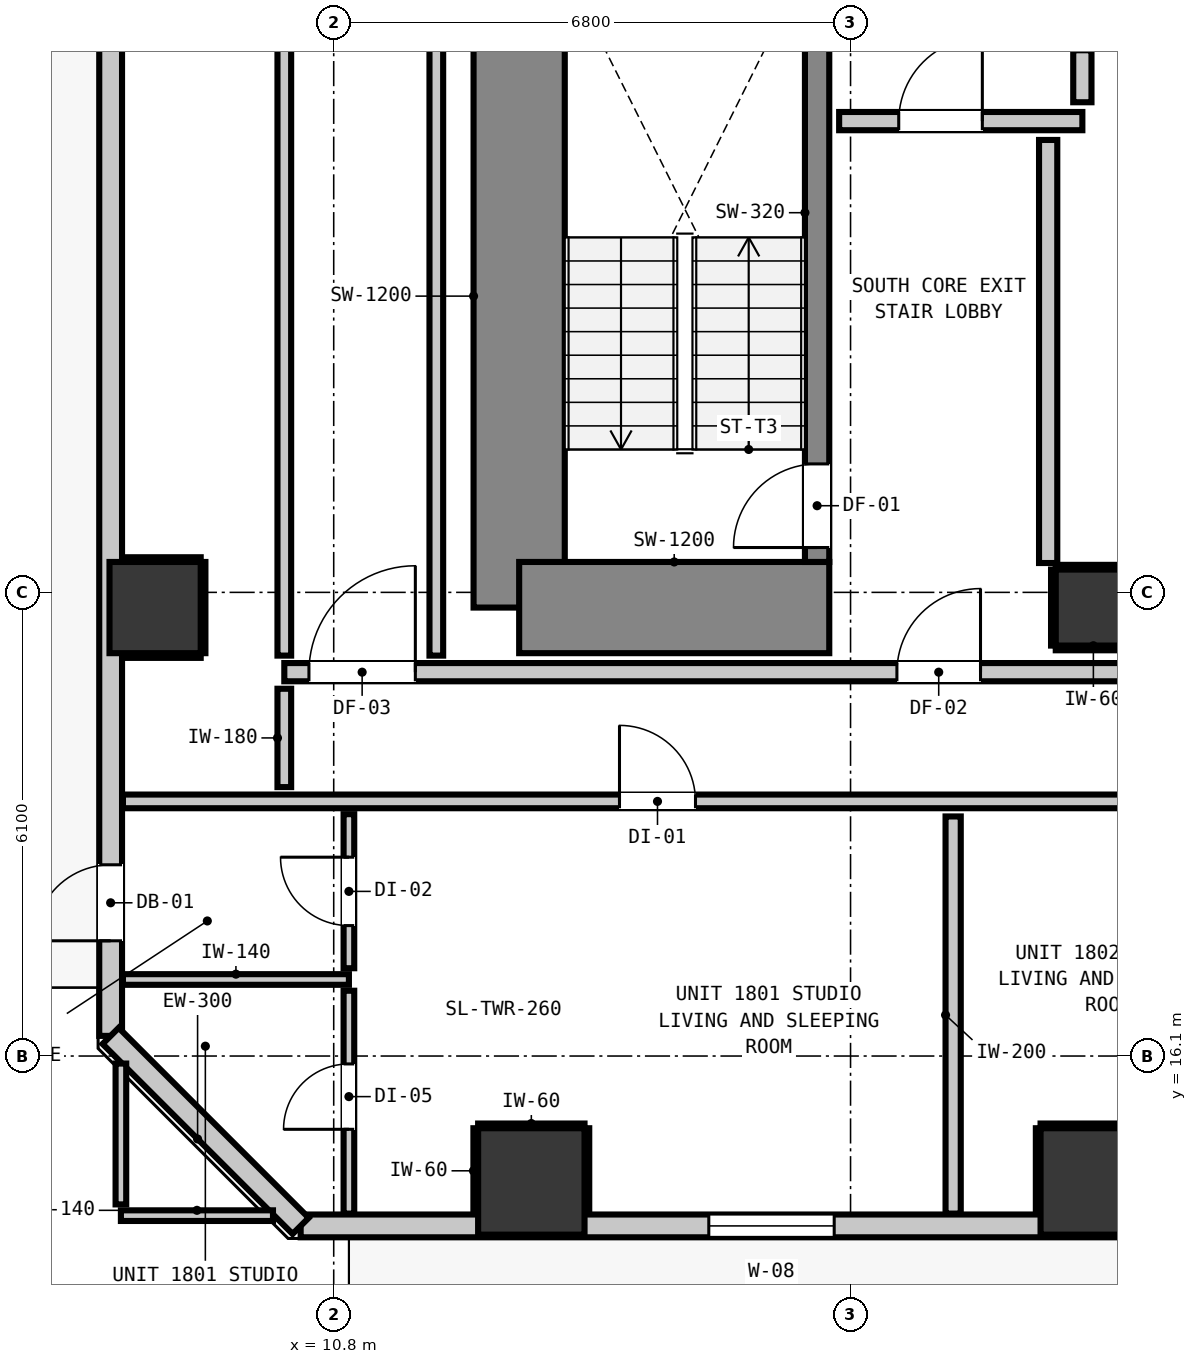
"""IFC4 building model, lengths in metres.
Left out: names, types, materials, properties, quantities, classifications, styles, units other than length and angle.
Written with IfcOpenShell. Run it as: python <this file> out.ifc"""

import sys

from ifc_helpers import new_model, si_unit, direction, frame, frame_2d, origin, origin_2d, place, context, subcontext, project, spatial, rectangle, extrude, element, fill, save


model = new_model("IFC4")
c1 = context("Model", 3, precision=1e-05, world=origin(), true_north=direction((0.0, 1.0)))
c2 = subcontext(c1, "Body", "Model", "MODEL_VIEW")
j1 = project(units=[si_unit("LENGTHUNIT", "METRE"), si_unit("PLANEANGLEUNIT", "RADIAN")], contexts=[c1])
p1 = place(None, origin())
s1 = spatial("IfcSite", under=j1, at=p1, CompositionType="ELEMENT")
p2 = place(p1, origin())
s2 = spatial("IfcBuilding", under=s1, at=p2, CompositionType="ELEMENT")
p3 = place(p2, frame((0.0, 0.0, 65.16)))
s3 = spatial("IfcBuildingStorey", under=s2, at=p3, CompositionType="ELEMENT", Elevation=65.16)
p4 = place(p3, frame((20.8, 22.0, 0.0), z_axis=(0.0, 0.0, 1.0), x_axis=(1.0, 0.0, 0.0)))
e1 = element("IfcColumn", 1, at=p4, inside=s3, PredefinedType="COLUMN", context=c2, shape_type="SweptSolid", body=[
    extrude(rectangle(XDim=1.0, YDim=1.0, at=origin_2d()), origin(), (0.0, 0.0, 1.0), 3.32),
])
p5 = place(p3, frame((13.24, 22.0, 0.0), z_axis=(0.0, 0.0, 1.0), x_axis=(0.0, 1.0, 0.0)))
e2 = element("IfcWall", 2, at=p5, inside=s3, PredefinedType="SHEAR", context=c2, shape_type="SweptSolid", body=[
    extrude(rectangle(XDim=8.195, YDim=1.2, at=frame_2d((4.098, 0.0))), origin(), (0.0, 0.0, 1.0), 3.32),
])
p6 = place(p3, frame((13.24, 22.0, 0.0), z_axis=(0.0, 0.0, 1.0), x_axis=(1.0, 0.0, 0.0)))
e3 = element("IfcWall", 3, at=p6, inside=s3, PredefinedType="SHEAR", context=c2, shape_type="SweptSolid", body=[
    extrude(rectangle(XDim=4.08, YDim=1.2, at=frame_2d((2.04, 0.0))), origin(), (0.0, 0.0, 1.0), 3.32),
])
p7 = place(p3, frame((17.16, 22.6, 0.0), z_axis=(0.0, 0.0, 1.0), x_axis=(0.0, 1.0, 0.0)))
e4 = element("IfcWall", 4, at=p7, inside=s3, PredefinedType="SHEAR", context=c2, shape_type="SweptSolid", body=[
    extrude(rectangle(XDim=7.8, YDim=0.32, at=frame_2d((3.9, 0.0))), origin(), (0.0, 0.0, 1.0), 3.32),
])
p8 = place(p7, frame((0.19, 0.0, 0.0)))
e5 = element("IfcOpeningElement", 5, at=p8, cuts=e4, PredefinedType="OPENING", context=c2, shape_type="SweptSolid", body=[
    extrude(rectangle(XDim=1.1, YDim=2.15, at=frame_2d((0.55, 1.075))), frame((0.0, 0.17, 0.0), z_axis=(0.0, -1.0, 0.0), x_axis=(1.0, 0.0, 0.0)), (0.0, 0.0, 1.0), 0.34),
])
for number, where, z_axis, x_axis in (
    (6, (13.4, 14.45, 0.0), (0.0, 0.0, 1.0), (1.0, 0.0, 0.0)),
    (7, (20.8, 14.45, 0.0), (0.0, 0.0, 1.0), (1.0, 0.0, 0.0)),
):
    element("IfcColumn", number, at=place(p3, frame(where, z_axis=z_axis, x_axis=x_axis)), inside=s3, PredefinedType="COLUMN", context=c2, shape_type="SweptSolid", body=[
        extrude(rectangle(XDim=1.4, YDim=1.4, at=origin_2d()), origin(), (0.0, 0.0, 1.0), 3.32),
    ])
p9 = place(p3, frame((8.45, 22.0, 0.0), z_axis=(0.0, 0.0, 1.0), x_axis=(1.0, 0.0, 0.0)))
e8 = element("IfcColumn", 8, at=p9, inside=s3, PredefinedType="COLUMN", context=c2, shape_type="SweptSolid", body=[
    extrude(rectangle(XDim=1.2, YDim=1.2, at=origin_2d()), origin(), (0.0, 0.0, 1.0), 3.32),
])
p10 = place(p3, frame((7.865, 16.365, 0.0), z_axis=(0.0, 0.0, 1.0), x_axis=(0.0, 1.0, 0.0)))
e9 = element("IfcWall", 9, at=p10, inside=s3, PredefinedType="STANDARD", context=c2, shape_type="SweptSolid", body=[
    extrude(rectangle(XDim=34.67, YDim=0.3, at=frame_2d((17.335, 0.0))), origin(), (0.0, 0.0, 1.0), 3.06),
])
p11 = place(p10, frame((1.251, 0.0, 0.0)))
e10 = element("IfcOpeningElement", 10, at=p11, cuts=e9, PredefinedType="OPENING", context=c2, shape_type="SweptSolid", body=[
    extrude(rectangle(XDim=1.0, YDim=2.15, at=frame_2d((0.5, 1.075))), frame((0.0, 0.16, 0.0), z_axis=(0.0, -1.0, 0.0), x_axis=(1.0, 0.0, 0.0)), (0.0, 0.0, 1.0), 0.32),
])
p12 = place(p10, frame((32.432, 0.0, 0.85)))
e11 = element("IfcOpeningElement", 11, at=p12, cuts=e9, PredefinedType="OPENING", context=c2, shape_type="SweptSolid", body=[
    extrude(rectangle(XDim=1.65, YDim=1.75, at=frame_2d((0.825, 0.875))), frame((0.0, 0.16, 0.0), z_axis=(0.0, -1.0, 0.0), x_axis=(1.0, 0.0, 0.0)), (0.0, 0.0, 1.0), 0.32),
])
p13 = place(p3, frame((47.835, 13.865, 0.0), z_axis=(0.0, 0.0, 1.0), x_axis=(-1.0, 0.0, 0.0)))
e12 = element("IfcWall", 12, at=p13, inside=s3, PredefinedType="STANDARD", context=c2, shape_type="SweptSolid", body=[
    extrude(rectangle(XDim=37.47, YDim=0.3, at=frame_2d((18.735, 0.0))), origin(), (0.0, 0.0, 1.0), 3.06),
])
p14 = place(p13, frame((1.251, 0.0, 0.0)))
e13 = element("IfcOpeningElement", 13, at=p14, cuts=e12, PredefinedType="OPENING", context=c2, shape_type="SweptSolid", body=[
    extrude(rectangle(XDim=1.0, YDim=2.15, at=frame_2d((0.5, 1.075))), frame((0.0, 0.16, 0.0), z_axis=(0.0, -1.0, 0.0), x_axis=(1.0, 0.0, 0.0)), (0.0, 0.0, 1.0), 0.32),
])
p15 = place(p13, frame((30.45, 0.0, 0.85)))
e14 = element("IfcOpeningElement", 14, at=p15, cuts=e12, PredefinedType="OPENING", context=c2, shape_type="SweptSolid", body=[
    extrude(rectangle(XDim=1.65, YDim=1.75, at=frame_2d((0.825, 0.875))), frame((0.0, 0.16, 0.0), z_axis=(0.0, -1.0, 0.0), x_axis=(1.0, 0.0, 0.0)), (0.0, 0.0, 1.0), 0.32),
])
p16 = place(p13, frame((24.05, 0.0, 0.85)))
e15 = element("IfcOpeningElement", 15, at=p16, cuts=e12, PredefinedType="OPENING", context=c2, shape_type="SweptSolid", body=[
    extrude(rectangle(XDim=1.65, YDim=1.75, at=frame_2d((0.825, 0.875))), frame((0.0, 0.16, 0.0), z_axis=(0.0, -1.0, 0.0), x_axis=(1.0, 0.0, 0.0)), (0.0, 0.0, 1.0), 0.32),
])
p17 = place(p13, frame((13.457, 0.0, 0.85)))
e16 = element("IfcOpeningElement", 16, at=p17, cuts=e12, PredefinedType="OPENING", context=c2, shape_type="SweptSolid", body=[
    extrude(rectangle(XDim=1.65, YDim=1.75, at=frame_2d((0.825, 0.875))), frame((0.0, 0.16, 0.0), z_axis=(0.0, -1.0, 0.0), x_axis=(1.0, 0.0, 0.0)), (0.0, 0.0, 1.0), 0.32),
])
p18 = place(p13, frame((16.017, 0.0, 0.85)))
e17 = element("IfcOpeningElement", 17, at=p18, cuts=e12, PredefinedType="OPENING", context=c2, shape_type="SweptSolid", body=[
    extrude(rectangle(XDim=1.65, YDim=1.75, at=frame_2d((0.825, 0.875))), frame((0.0, 0.16, 0.0), z_axis=(0.0, -1.0, 0.0), x_axis=(1.0, 0.0, 0.0)), (0.0, 0.0, 1.0), 0.32),
])
p19 = place(p13, frame((4.992, 0.0, 0.85)))
e18 = element("IfcOpeningElement", 18, at=p19, cuts=e12, PredefinedType="OPENING", context=c2, shape_type="SweptSolid", body=[
    extrude(rectangle(XDim=1.65, YDim=1.75, at=frame_2d((0.825, 0.875))), frame((0.0, 0.16, 0.0), z_axis=(0.0, -1.0, 0.0), x_axis=(1.0, 0.0, 0.0)), (0.0, 0.0, 1.0), 0.32),
])
p20 = place(p3, frame((10.365, 13.865, 0.0), z_axis=(0.0, 0.0, 1.0), x_axis=(-0.707106781187, 0.707106781187, 0.0)))
e19 = element("IfcWall", 19, at=p20, inside=s3, PredefinedType="STANDARD", context=c2, shape_type="SweptSolid", body=[
    extrude(rectangle(XDim=3.536, YDim=0.3, at=frame_2d((1.768, 0.0))), origin(), (0.0, 0.0, 1.0), 3.06),
])
p21 = place(p3, frame((10.15, 21.15, 0.0), z_axis=(0.0, 0.0, 1.0), x_axis=(1.0, 0.0, 0.0)))
e20 = element("IfcWall", 20, at=p21, inside=s3, PredefinedType="PARTITIONING", context=c2, shape_type="SweptSolid", body=[
    extrude(rectangle(XDim=26.779, YDim=0.24, at=frame_2d((13.39, 0.0))), origin(), (0.0, 0.0, 1.0), 3.06),
])
p22 = place(p21, frame((8.06, 0.0, 0.0)))
e21 = element("IfcOpeningElement", 21, at=p22, cuts=e20, PredefinedType="OPENING", context=c2, shape_type="SweptSolid", body=[
    extrude(rectangle(XDim=1.1, YDim=2.15, at=frame_2d((0.55, 1.075))), frame((0.0, 0.13, 0.0), z_axis=(0.0, -1.0, 0.0), x_axis=(1.0, 0.0, 0.0)), (0.0, 0.0, 1.0), 0.26),
])
p23 = place(p21, frame((0.324, 0.0, 0.0)))
e22 = element("IfcOpeningElement", 22, at=p23, cuts=e20, PredefinedType="OPENING", context=c2, shape_type="SweptSolid", body=[
    extrude(rectangle(XDim=1.4, YDim=2.15, at=frame_2d((0.7, 1.075))), frame((0.0, 0.13, 0.0), z_axis=(0.0, -1.0, 0.0), x_axis=(1.0, 0.0, 0.0)), (0.0, 0.0, 1.0), 0.26),
])
p24 = place(p3, frame((17.45, 28.4, 0.0), z_axis=(0.0, 0.0, 1.0), x_axis=(1.0, 0.0, 0.0)))
e23 = element("IfcWall", 23, at=p24, inside=s3, PredefinedType="PARTITIONING", context=c2, shape_type="SweptSolid", body=[
    extrude(rectangle(XDim=3.2, YDim=0.24, at=frame_2d((1.6, 0.0))), origin(), (0.0, 0.0, 1.0), 3.06),
])
p25 = place(p24, frame((0.784, 0.0, 0.0)))
e24 = element("IfcOpeningElement", 24, at=p25, cuts=e23, PredefinedType="OPENING", context=c2, shape_type="SweptSolid", body=[
    extrude(rectangle(XDim=1.1, YDim=2.15, at=frame_2d((0.55, 1.075))), frame((0.0, 0.13, 0.0), z_axis=(0.0, -1.0, 0.0), x_axis=(1.0, 0.0, 0.0)), (0.0, 0.0, 1.0), 0.26),
])
p26 = place(p3, frame((8.027, 19.45, 0.0), z_axis=(0.0, 0.0, 1.0), x_axis=(1.0, 0.0, 0.0)))
e25 = element("IfcWall", 25, at=p26, inside=s3, PredefinedType="PARTITIONING", context=c2, shape_type="SweptSolid", body=[
    extrude(rectangle(XDim=28.902, YDim=0.18, at=frame_2d((14.451, 0.0))), origin(), (0.0, 0.0, 1.0), 3.06),
])
p27 = place(p26, frame((6.533, 0.0, 0.0)))
e26 = element("IfcOpeningElement", 26, at=p27, cuts=e25, PredefinedType="OPENING", context=c2, shape_type="SweptSolid", body=[
    extrude(rectangle(XDim=1.0, YDim=2.15, at=frame_2d((0.5, 1.075))), frame((0.0, 0.1, 0.0), z_axis=(0.0, -1.0, 0.0), x_axis=(1.0, 0.0, 0.0)), (0.0, 0.0, 1.0), 0.2),
])
p28 = place(p26, frame((13.293, 0.0, 0.0)))
e27 = element("IfcOpeningElement", 27, at=p28, cuts=e25, PredefinedType="OPENING", context=c2, shape_type="SweptSolid", body=[
    extrude(rectangle(XDim=1.0, YDim=2.15, at=frame_2d((0.5, 1.075))), frame((0.0, 0.1, 0.0), z_axis=(0.0, -1.0, 0.0), x_axis=(1.0, 0.0, 0.0)), (0.0, 0.0, 1.0), 0.2),
])
p29 = place(p26, frame((25.026, 0.0, 0.0)))
e28 = element("IfcOpeningElement", 28, at=p29, cuts=e25, PredefinedType="OPENING", context=c2, shape_type="SweptSolid", body=[
    extrude(rectangle(XDim=1.0, YDim=2.15, at=frame_2d((0.5, 1.075))), frame((0.0, 0.1, 0.0), z_axis=(0.0, -1.0, 0.0), x_axis=(1.0, 0.0, 0.0)), (0.0, 0.0, 1.0), 0.2),
])
p30 = place(p3, frame((8.0, 14.0, 0.0), z_axis=(0.0, 0.0, 1.0), x_axis=(1.0, 0.0, 0.0)))
e29 = element("IfcWall", 29, at=p30, inside=s3, PredefinedType="PARTITIONING", context=c2, shape_type="SweptSolid", body=[
    extrude(rectangle(XDim=2.001, YDim=0.14, at=frame_2d((1.0, 0.0))), origin(), (0.0, 0.0, 1.0), 3.06),
])
p31 = place(p3, frame((8.027, 17.107, 0.0), z_axis=(0.0, 0.0, 1.0), x_axis=(1.0, 0.0, 0.0)))
e30 = element("IfcWall", 30, at=p31, inside=s3, PredefinedType="PARTITIONING", context=c2, shape_type="SweptSolid", body=[
    extrude(rectangle(XDim=2.973, YDim=0.14, at=frame_2d((1.486, 0.0))), origin(), (0.0, 0.0, 1.0), 3.06),
])
p32 = place(p3, frame((20.2, 22.586, 0.0), z_axis=(0.0, 0.0, 1.0), x_axis=(0.0, 1.0, 0.0)))
e31 = element("IfcWall", 31, at=p32, inside=s3, PredefinedType="PARTITIONING", context=c2, shape_type="SweptSolid", body=[
    extrude(rectangle(XDim=5.566, YDim=0.24, at=frame_2d((2.783, 0.0))), origin(), (0.0, 0.0, 1.0), 3.06),
])
p33 = place(p3, frame((20.65, 28.648, 0.0), z_axis=(0.0, 0.0, 1.0), x_axis=(0.0, 1.0, 0.0)))
e32 = element("IfcWall", 32, at=p33, inside=s3, PredefinedType="PARTITIONING", context=c2, shape_type="SweptSolid", body=[
    extrude(rectangle(XDim=0.684, YDim=0.24, at=frame_2d((0.342, 0.0))), origin(), (0.0, 0.0, 1.0), 2.295),
])
p34 = place(p3, frame((18.95, 14.027, 0.0), z_axis=(0.0, 0.0, 1.0), x_axis=(0.0, 1.0, 0.0)))
e33 = element("IfcWall", 33, at=p34, inside=s3, PredefinedType="PARTITIONING", context=c2, shape_type="SweptSolid", body=[
    extrude(rectangle(XDim=5.225, YDim=0.2, at=frame_2d((2.612, 0.0))), origin(), (0.0, 0.0, 1.0), 3.06),
])
p35 = place(p3, frame((10.15, 19.638, 0.0), z_axis=(0.0, 0.0, 1.0), x_axis=(0.0, 1.0, 0.0)))
e34 = element("IfcWall", 34, at=p35, inside=s3, PredefinedType="PARTITIONING", context=c2, shape_type="SweptSolid", body=[
    extrude(rectangle(XDim=1.294, YDim=0.18, at=frame_2d((0.647, 0.0))), origin(), (0.0, 0.0, 1.0), 2.445),
])
for number, where, z_axis, x_axis in (
    (35, (10.15, 21.368, 0.0), (0.0, 0.0, 1.0), (0.0, 1.0, 0.0)),
    (36, (12.15, 21.368, 0.0), (0.0, 0.0, 1.0), (0.0, 1.0, 0.0)),
):
    element("IfcWall", number, at=place(p3, frame(where, z_axis=z_axis, x_axis=x_axis)), inside=s3, PredefinedType="PARTITIONING", context=c2, shape_type="SweptSolid", body=[
        extrude(rectangle(XDim=18.694, YDim=0.18, at=frame_2d((9.347, 0.0))), origin(), (0.0, 0.0, 1.0), 3.06),
    ])
p36 = place(p3, frame((8.0, 14.148, 0.0), z_axis=(0.0, 0.0, 1.0), x_axis=(0.0, 1.0, 0.0)))
e37 = element("IfcWall", 37, at=p36, inside=s3, PredefinedType="PARTITIONING", context=c2, shape_type="SweptSolid", body=[
    extrude(rectangle(XDim=1.853, YDim=0.14, at=frame_2d((0.927, 0.0))), origin(), (0.0, 0.0, 1.0), 3.06),
])
p37 = place(p3, frame((11.0, 14.027, 0.0), z_axis=(0.0, 0.0, 1.0), x_axis=(0.0, 1.0, 0.0)))
e38 = element("IfcWall", 38, at=p37, inside=s3, PredefinedType="PARTITIONING", context=c2, shape_type="SweptSolid", body=[
    extrude(rectangle(XDim=2.932, YDim=0.14, at=frame_2d((1.466, 0.0))), origin(), (0.0, 0.0, 1.0), 3.06),
])
p38 = place(p37, frame((1.109, 0.0, 0.0)))
e39 = element("IfcOpeningElement", 39, at=p38, cuts=e38, PredefinedType="OPENING", context=c2, shape_type="SweptSolid", body=[
    extrude(rectangle(XDim=0.86, YDim=2.02, at=frame_2d((0.43, 1.01))), frame((0.0, 0.08, 0.0), z_axis=(0.0, -1.0, 0.0), x_axis=(1.0, 0.0, 0.0)), (0.0, 0.0, 1.0), 0.16),
])
p39 = place(p3, frame((11.0, 17.255, 0.0), z_axis=(0.0, 0.0, 1.0), x_axis=(0.0, 1.0, 0.0)))
e40 = element("IfcWall", 40, at=p39, inside=s3, PredefinedType="PARTITIONING", context=c2, shape_type="SweptSolid", body=[
    extrude(rectangle(XDim=2.027, YDim=0.14, at=frame_2d((1.014, 0.0))), origin(), (0.0, 0.0, 1.0), 2.445),
])
p40 = place(p39, frame((0.561, 0.0, 0.0)))
e41 = element("IfcOpeningElement", 41, at=p40, cuts=e40, PredefinedType="OPENING", context=c2, shape_type="SweptSolid", body=[
    extrude(rectangle(XDim=0.9, YDim=2.1, at=frame_2d((0.45, 1.05))), frame((0.0, 0.08, 0.0), z_axis=(0.0, -1.0, 0.0), x_axis=(1.0, 0.0, 0.0)), (0.0, 0.0, 1.0), 0.16),
])
for number, where, z_axis, x_axis in (
    (42, (20.3, 21.468, 0.0), (0.0, 0.0, 1.0), (1.0, 0.0, 0.0)),
    (43, (20.3, 22.532, 0.0), (0.0, 0.0, 1.0), (1.0, 0.0, 0.0)),
):
    element("IfcWall", number, at=place(p3, frame(where, z_axis=z_axis, x_axis=x_axis)), inside=s3, PredefinedType="PARTITIONING", context=c2, shape_type="SweptSolid", body=[
        extrude(rectangle(XDim=0.99, YDim=0.06, at=frame_2d((0.495, 0.0))), origin(), (0.0, 0.0, 1.0), 1.45),
    ])
p41 = place(p3, frame((20.268, 21.5, 0.0), z_axis=(0.0, 0.0, 1.0), x_axis=(0.0, 1.0, 0.0)))
e44 = element("IfcWall", 44, at=p41, inside=s3, PredefinedType="PARTITIONING", context=c2, shape_type="SweptSolid", body=[
    extrude(rectangle(XDim=1.0, YDim=0.06, at=frame_2d((0.5, 0.0))), origin(), (0.0, 0.0, 1.0), 1.45),
])
p42 = place(p3, frame((12.7, 15.182, 0.0), z_axis=(0.0, 0.0, 1.0), x_axis=(1.0, 0.0, 0.0)))
e45 = element("IfcWall", 45, at=p42, inside=s3, PredefinedType="PARTITIONING", context=c2, shape_type="SweptSolid", body=[
    extrude(rectangle(XDim=1.4, YDim=0.06, at=frame_2d((0.7, 0.0))), origin(), (0.0, 0.0, 1.0), 1.45),
])
for number, where, z_axis, x_axis in (
    (46, (12.668, 14.03, 0.0), (0.0, 0.0, 1.0), (0.0, 1.0, 0.0)),
    (47, (14.132, 14.03, 0.0), (0.0, 0.0, 1.0), (0.0, 1.0, 0.0)),
):
    element("IfcWall", number, at=place(p3, frame(where, z_axis=z_axis, x_axis=x_axis)), inside=s3, PredefinedType="PARTITIONING", context=c2, shape_type="SweptSolid", body=[
        extrude(rectangle(XDim=1.12, YDim=0.06, at=frame_2d((0.56, 0.0))), origin(), (0.0, 0.0, 1.0), 1.45),
    ])
p43 = place(p3, frame((20.1, 15.182, 0.0), z_axis=(0.0, 0.0, 1.0), x_axis=(1.0, 0.0, 0.0)))
e48 = element("IfcWall", 48, at=p43, inside=s3, PredefinedType="PARTITIONING", context=c2, shape_type="SweptSolid", body=[
    extrude(rectangle(XDim=1.4, YDim=0.06, at=frame_2d((0.7, 0.0))), origin(), (0.0, 0.0, 1.0), 1.45),
])
p44 = place(p3, frame((20.068, 14.03, 0.0), z_axis=(0.0, 0.0, 1.0), x_axis=(0.0, 1.0, 0.0)))
e49 = element("IfcWall", 49, at=p44, inside=s3, PredefinedType="PARTITIONING", context=c2, shape_type="SweptSolid", body=[
    extrude(rectangle(XDim=1.12, YDim=0.06, at=frame_2d((0.56, 0.0))), origin(), (0.0, 0.0, 1.0), 1.45),
])
for number, where, z_axis, x_axis in (
    (50, (8.03, 21.368, 0.0), (0.0, 0.0, 1.0), (1.0, 0.0, 0.0)),
    (51, (8.03, 22.632, 0.0), (0.0, 0.0, 1.0), (1.0, 0.0, 0.0)),
):
    element("IfcWall", number, at=place(p3, frame(where, z_axis=z_axis, x_axis=x_axis)), inside=s3, PredefinedType="PARTITIONING", context=c2, shape_type="SweptSolid", body=[
        extrude(rectangle(XDim=1.02, YDim=0.06, at=frame_2d((0.51, 0.0))), origin(), (0.0, 0.0, 1.0), 1.45),
    ])
p45 = place(p3, frame((9.082, 21.4, 0.0), z_axis=(0.0, 0.0, 1.0), x_axis=(0.0, 1.0, 0.0)))
e52 = element("IfcWall", 52, at=p45, inside=s3, PredefinedType="PARTITIONING", context=c2, shape_type="SweptSolid", body=[
    extrude(rectangle(XDim=1.2, YDim=0.06, at=frame_2d((0.6, 0.0))), origin(), (0.0, 0.0, 1.0), 1.45),
])
p46 = place(p11, origin())
e53 = element("IfcDoor", 53, at=p46, inside=s3, OperationType="SINGLE_SWING_LEFT", PredefinedType="DOOR", context=c2, shape_type="SweptSolid", body=[
    extrude(rectangle(XDim=1.0, YDim=2.15, at=frame_2d((0.5, 1.075))), frame((0.0, 0.025, 0.0), z_axis=(0.0, -1.0, 0.0), x_axis=(1.0, 0.0, 0.0)), (0.0, 0.0, 1.0), 0.05),
])
fill(e10, e53)
p47 = place(p15, origin())
e54 = element("IfcWindow", 54, at=p47, inside=s3, PartitioningType="SINGLE_PANEL", PredefinedType="WINDOW", context=c2, shape_type="SweptSolid", body=[
    extrude(rectangle(XDim=1.65, YDim=1.75, at=frame_2d((0.825, 0.875))), frame((0.0, 0.03, 0.0), z_axis=(0.0, -1.0, 0.0), x_axis=(1.0, 0.0, 0.0)), (0.0, 0.0, 1.0), 0.06),
])
fill(e14, e54)
p48 = place(p8, origin())
e55 = element("IfcDoor", 55, at=p48, inside=s3, OperationType="SINGLE_SWING_LEFT", PredefinedType="DOOR", context=c2, shape_type="SweptSolid", body=[
    extrude(rectangle(XDim=1.1, YDim=2.15, at=frame_2d((0.55, 1.075))), frame((0.0, 0.025, 0.0), z_axis=(0.0, -1.0, 0.0), x_axis=(1.0, 0.0, 0.0)), (0.0, 0.0, 1.0), 0.05),
])
fill(e5, e55)
p49 = place(p25, origin())
e56 = element("IfcDoor", 56, at=p49, inside=s3, OperationType="SINGLE_SWING_RIGHT", PredefinedType="DOOR", context=c2, shape_type="SweptSolid", body=[
    extrude(rectangle(XDim=1.1, YDim=2.15, at=frame_2d((0.55, 1.075))), frame((0.0, 0.025, 0.0), z_axis=(0.0, -1.0, 0.0), x_axis=(1.0, 0.0, 0.0)), (0.0, 0.0, 1.0), 0.05),
])
fill(e24, e56)
p50 = place(p22, origin())
e57 = element("IfcDoor", 57, at=p50, inside=s3, OperationType="SINGLE_SWING_RIGHT", PredefinedType="DOOR", context=c2, shape_type="SweptSolid", body=[
    extrude(rectangle(XDim=1.1, YDim=2.15, at=frame_2d((0.55, 1.075))), frame((0.0, 0.025, 0.0), z_axis=(0.0, -1.0, 0.0), x_axis=(1.0, 0.0, 0.0)), (0.0, 0.0, 1.0), 0.05),
])
fill(e21, e57)
p51 = place(p23, origin())
e58 = element("IfcDoor", 58, at=p51, inside=s3, OperationType="SINGLE_SWING_RIGHT", PredefinedType="DOOR", context=c2, shape_type="SweptSolid", body=[
    extrude(rectangle(XDim=1.4, YDim=2.15, at=frame_2d((0.7, 1.075))), frame((0.0, 0.025, 0.0), z_axis=(0.0, -1.0, 0.0), x_axis=(1.0, 0.0, 0.0)), (0.0, 0.0, 1.0), 0.05),
])
fill(e22, e58)
p52 = place(p27, origin())
e59 = element("IfcDoor", 59, at=p52, inside=s3, OperationType="SINGLE_SWING_LEFT", PredefinedType="DOOR", context=c2, shape_type="SweptSolid", body=[
    extrude(rectangle(XDim=1.0, YDim=2.15, at=frame_2d((0.5, 1.075))), frame((0.0, 0.025, 0.0), z_axis=(0.0, -1.0, 0.0), x_axis=(1.0, 0.0, 0.0)), (0.0, 0.0, 1.0), 0.05),
])
fill(e26, e59)
p53 = place(p40, origin())
e60 = element("IfcDoor", 60, at=p53, inside=s3, OperationType="SINGLE_SWING_RIGHT", PredefinedType="DOOR", context=c2, shape_type="SweptSolid", body=[
    extrude(rectangle(XDim=0.9, YDim=2.1, at=frame_2d((0.45, 1.05))), frame((0.0, 0.025, 0.0), z_axis=(0.0, -1.0, 0.0), x_axis=(1.0, 0.0, 0.0)), (0.0, 0.0, 1.0), 0.05),
])
fill(e41, e60)
p54 = place(p38, origin())
e61 = element("IfcDoor", 61, at=p54, inside=s3, OperationType="SINGLE_SWING_LEFT", PredefinedType="DOOR", context=c2, shape_type="SweptSolid", body=[
    extrude(rectangle(XDim=0.86, YDim=2.02, at=frame_2d((0.43, 1.01))), frame((0.0, 0.025, 0.0), z_axis=(0.0, -1.0, 0.0), x_axis=(1.0, 0.0, 0.0)), (0.0, 0.0, 1.0), 0.05),
])
fill(e39, e61)
save(model, sys.argv[1])
